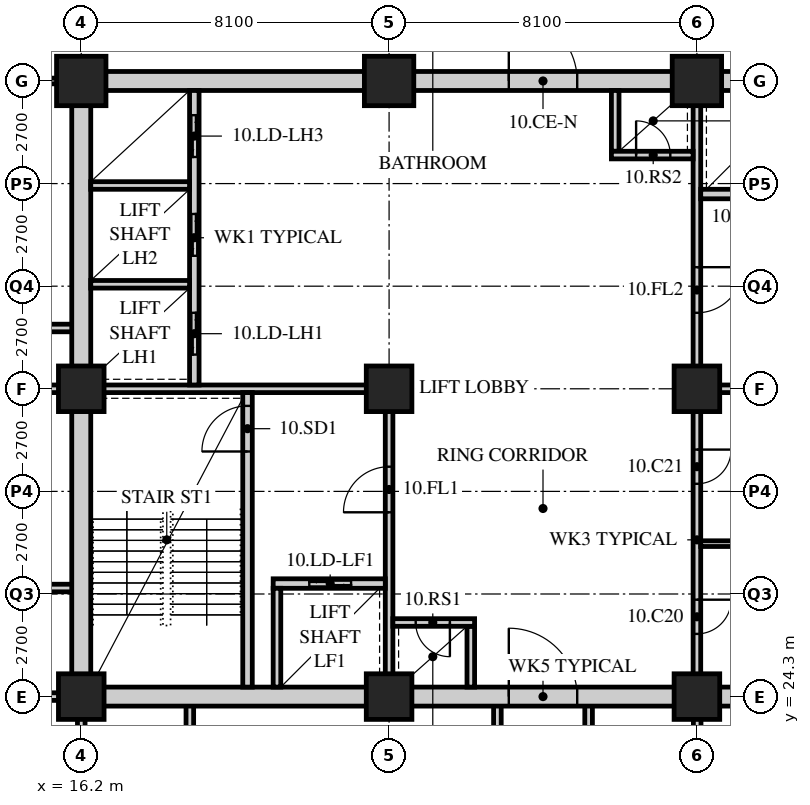
"""IFC4 building model, lengths in metres.
Left out: names, types, materials, properties, quantities, classifications, styles, units other than length and angle.
Written with IfcOpenShell. Run it as: python <this file> out.ifc"""

import sys

from ifc_helpers import new_model, si_unit, direction, frame, frame_2d, origin, origin_2d, place, context, subcontext, project, spatial, rectangle, hollow_rectangle, extrude, element, fill, save


model = new_model("IFC4")
c1 = context("Model", 3, precision=1e-05, world=origin(), true_north=direction((0.0, 1.0)))
c2 = subcontext(c1, "Body", "Model", "MODEL_VIEW")
j1 = project(units=[si_unit("LENGTHUNIT", "METRE"), si_unit("PLANEANGLEUNIT", "RADIAN")], contexts=[c1])
p1 = place(None, origin())
s1 = spatial("IfcSite", under=j1, at=p1, CompositionType="ELEMENT")
p2 = place(p1, origin())
s2 = spatial("IfcBuilding", under=s1, at=p2, CompositionType="ELEMENT")
p3 = place(p2, frame((0.0, 0.0, 46.6)))
s3 = spatial("IfcBuildingStorey", under=s2, at=p3, CompositionType="ELEMENT", Elevation=46.6)
for number, where, z_axis, x_axis in (
    (1, (16.2, 24.3, 0.0), (0.0, 0.0, 1.0), (1.0, 0.0, 0.0)),
    (2, (16.2, 32.4, 0.0), (0.0, 0.0, 1.0), (1.0, 0.0, 0.0)),
):
    element("IfcColumn", number, at=place(p3, frame(where, z_axis=z_axis, x_axis=x_axis)), inside=s3, PredefinedType="COLUMN", context=c2, shape_type="SweptSolid", body=[
        extrude(hollow_rectangle(XDim=1.2, YDim=1.2, WallThickness=0.12, at=origin_2d()), origin(), (0.0, 0.0, 1.0), 3.4),
    ])
p4 = place(p3, frame((16.2, 40.5, 0.0), z_axis=(0.0, 0.0, 1.0), x_axis=(1.0, 0.0, 0.0)))
e3 = element("IfcColumn", 3, at=p4, inside=s3, PredefinedType="COLUMN", context=c2, shape_type="SweptSolid", body=[
    extrude(hollow_rectangle(XDim=1.3, YDim=1.3, WallThickness=0.13, at=origin_2d()), origin(), (0.0, 0.0, 1.0), 3.4),
])
for number, where, z_axis, x_axis in (
    (4, (24.3, 24.3, 0.0), (0.0, 0.0, 1.0), (1.0, 0.0, 0.0)),
    (5, (24.3, 32.4, 0.0), (0.0, 0.0, 1.0), (1.0, 0.0, 0.0)),
):
    element("IfcColumn", number, at=place(p3, frame(where, z_axis=z_axis, x_axis=x_axis)), inside=s3, PredefinedType="COLUMN", context=c2, shape_type="SweptSolid", body=[
        extrude(hollow_rectangle(XDim=1.2, YDim=1.2, WallThickness=0.12, at=origin_2d()), origin(), (0.0, 0.0, 1.0), 3.4),
    ])
p5 = place(p3, frame((24.3, 40.5, 0.0), z_axis=(0.0, 0.0, 1.0), x_axis=(1.0, 0.0, 0.0)))
e6 = element("IfcColumn", 6, at=p5, inside=s3, PredefinedType="COLUMN", context=c2, shape_type="SweptSolid", body=[
    extrude(hollow_rectangle(XDim=1.3, YDim=1.3, WallThickness=0.13, at=origin_2d()), origin(), (0.0, 0.0, 1.0), 3.4),
])
for number, where, z_axis, x_axis in (
    (7, (32.4, 24.3, 0.0), (0.0, 0.0, 1.0), (1.0, 0.0, 0.0)),
    (8, (32.4, 32.4, 0.0), (0.0, 0.0, 1.0), (1.0, 0.0, 0.0)),
):
    element("IfcColumn", number, at=place(p3, frame(where, z_axis=z_axis, x_axis=x_axis)), inside=s3, PredefinedType="COLUMN", context=c2, shape_type="SweptSolid", body=[
        extrude(hollow_rectangle(XDim=1.2, YDim=1.2, WallThickness=0.12, at=origin_2d()), origin(), (0.0, 0.0, 1.0), 3.4),
    ])
p6 = place(p3, frame((32.4, 40.5, 0.0), z_axis=(0.0, 0.0, 1.0), x_axis=(1.0, 0.0, 0.0)))
e9 = element("IfcColumn", 9, at=p6, inside=s3, PredefinedType="COLUMN", context=c2, shape_type="SweptSolid", body=[
    extrude(hollow_rectangle(XDim=1.3, YDim=1.3, WallThickness=0.13, at=origin_2d()), origin(), (0.0, 0.0, 1.0), 3.4),
])
p7 = place(p3, frame((16.0, 40.5, 0.0), z_axis=(0.0, 0.0, 1.0), x_axis=(-1.0, 0.0, 0.0)))
e10 = element("IfcWall", 10, at=p7, inside=s3, PredefinedType="PARTITIONING", context=c2, shape_type="SweptSolid", body=[
    extrude(rectangle(XDim=6.1, YDim=0.15, at=frame_2d((3.05, 0.0))), origin(), (0.0, 0.0, 1.0), 2.578),
])
p8 = place(p3, frame((9.9, 32.4, 0.0), z_axis=(0.0, 0.0, 1.0), x_axis=(1.0, 0.0, 0.0)))
e11 = element("IfcWall", 11, at=p8, inside=s3, PredefinedType="SOLIDWALL", context=c2, shape_type="SweptSolid", body=[
    extrude(rectangle(XDim=6.3, YDim=0.2, at=frame_2d((3.15, 0.0))), origin(), (0.0, 0.0, 1.0), 2.578),
])
for number, where, z_axis, x_axis in (
    (12, (9.9, 27.157, 0.0), (0.0, 0.0, 1.0), (1.0, 0.0, 0.0)),
    (13, (9.9, 34.0, 0.0), (0.0, 0.0, 1.0), (1.0, 0.0, 0.0)),
):
    element("IfcWall", number, at=place(p3, frame(where, z_axis=z_axis, x_axis=x_axis)), inside=s3, PredefinedType="SOLIDWALL", context=c2, shape_type="SweptSolid", body=[
        extrude(rectangle(XDim=6.3, YDim=0.2, at=frame_2d((3.15, 0.0))), origin(), (0.0, 0.0, 1.0), 3.19),
    ])
p9 = place(p3, frame((16.2, 18.0, 0.0), z_axis=(0.0, 0.0, 1.0), x_axis=(0.0, 1.0, 0.0)))
e14 = element("IfcWall", 14, at=p9, inside=s3, PredefinedType="SOLIDWALL", context=c2, shape_type="SweptSolid", body=[
    extrude(rectangle(XDim=6.3, YDim=0.2, at=frame_2d((3.15, 0.0))), origin(), (0.0, 0.0, 1.0), 2.578),
])
p10 = place(p3, frame((19.057, 18.0, 0.0), z_axis=(0.0, 0.0, 1.0), x_axis=(0.0, 1.0, 0.0)))
e15 = element("IfcWall", 15, at=p10, inside=s3, PredefinedType="SOLIDWALL", context=c2, shape_type="SweptSolid", body=[
    extrude(rectangle(XDim=6.3, YDim=0.2, at=frame_2d((3.15, 0.0))), origin(), (0.0, 0.0, 1.0), 3.19),
])
p11 = place(p3, frame((32.407, 18.0, 0.0), z_axis=(0.0, 0.0, 1.0), x_axis=(0.0, 1.0, 0.0)))
e16 = element("IfcWall", 16, at=p11, inside=s3, PredefinedType="SOLIDWALL", context=c2, shape_type="SweptSolid", body=[
    extrude(rectangle(XDim=6.3, YDim=0.2, at=frame_2d((3.15, 0.0))), origin(), (0.0, 0.0, 1.0), 2.578),
])
for number, where, z_axis, x_axis in (
    (17, (27.15, 18.0, 0.0), (0.0, 0.0, 1.0), (0.0, 1.0, 0.0)),
    (18, (29.55, 18.0, 0.0), (0.0, 0.0, 1.0), (0.0, 1.0, 0.0)),
):
    element("IfcWall", number, at=place(p3, frame(where, z_axis=z_axis, x_axis=x_axis)), inside=s3, PredefinedType="SOLIDWALL", context=c2, shape_type="SweptSolid", body=[
        extrude(rectangle(XDim=6.3, YDim=0.2, at=frame_2d((3.15, 0.0))), origin(), (0.0, 0.0, 1.0), 3.19),
    ])
p12 = place(p3, frame((9.9, 24.3, 0.0), z_axis=(0.0, 0.0, 1.0), x_axis=(1.0, 0.0, 0.0)))
e19 = element("IfcWall", 19, at=p12, inside=s3, PredefinedType="SOLIDWALL", context=c2, shape_type="SweptSolid", body=[
    extrude(rectangle(XDim=6.3, YDim=0.2, at=frame_2d((3.15, 0.0))), origin(), (0.0, 0.0, 1.0), 2.578),
])
p13 = place(p3, frame((15.95, 24.3, 0.0), z_axis=(0.0, 0.0, 1.0), x_axis=(1.0, 0.0, 0.0)))
e20 = element("IfcWall", 20, at=p13, inside=s3, PredefinedType="SOLIDWALL", context=c2, shape_type="SweptSolid", body=[
    extrude(rectangle(XDim=24.8, YDim=0.5, at=frame_2d((12.4, 0.0))), origin(), (0.0, 0.0, 1.0), 2.54),
])
p14 = place(p13, frame((11.5, 0.0, 0.0)))
e21 = element("IfcOpeningElement", 21, at=p14, cuts=e20, PredefinedType="OPENING", context=c2, shape_type="SweptSolid", body=[
    extrude(rectangle(XDim=1.8, YDim=2.4, at=frame_2d((0.9, 1.2))), frame((0.0, 0.26, 0.0), z_axis=(0.0, -1.0, 0.0), x_axis=(1.0, 0.0, 0.0)), (0.0, 0.0, 1.0), 0.52),
])
p15 = place(p3, frame((15.95, 40.5, 0.0), z_axis=(0.0, 0.0, 1.0), x_axis=(1.0, 0.0, 0.0)))
e22 = element("IfcWall", 22, at=p15, inside=s3, PredefinedType="SOLIDWALL", context=c2, shape_type="SweptSolid", body=[
    extrude(rectangle(XDim=24.8, YDim=0.5, at=frame_2d((12.4, 0.0))), origin(), (0.0, 0.0, 1.0), 2.54),
])
p16 = place(p15, frame((11.5, 0.0, 0.0)))
e23 = element("IfcOpeningElement", 23, at=p16, cuts=e22, PredefinedType="OPENING", context=c2, shape_type="SweptSolid", body=[
    extrude(rectangle(XDim=1.8, YDim=2.4, at=frame_2d((0.9, 1.2))), frame((0.0, 0.26, 0.0), z_axis=(0.0, -1.0, 0.0), x_axis=(1.0, 0.0, 0.0)), (0.0, 0.0, 1.0), 0.52),
])
p17 = place(p3, frame((16.2, 24.55, 0.0), z_axis=(0.0, 0.0, 1.0), x_axis=(0.0, 1.0, 0.0)))
e24 = element("IfcWall", 24, at=p17, inside=s3, PredefinedType="SOLIDWALL", context=c2, shape_type="SweptSolid", body=[
    extrude(rectangle(XDim=15.7, YDim=0.5, at=frame_2d((7.85, 0.0))), origin(), (0.0, 0.0, 1.0), 2.578),
])
p18 = place(p3, frame((16.45, 32.4, 0.0), z_axis=(0.0, 0.0, 1.0), x_axis=(1.0, 0.0, 0.0)))
e25 = element("IfcWall", 25, at=p18, inside=s3, PredefinedType="SOLIDWALL", context=c2, shape_type="SweptSolid", body=[
    extrude(rectangle(XDim=7.95, YDim=0.2, at=frame_2d((3.975, 0.0))), origin(), (0.0, 0.0, 1.0), 2.578),
])
p19 = place(p3, frame((24.3, 24.55, 0.0), z_axis=(0.0, 0.0, 1.0), x_axis=(0.0, 1.0, 0.0)))
e26 = element("IfcWall", 26, at=p19, inside=s3, PredefinedType="SOLIDWALL", context=c2, shape_type="SweptSolid", body=[
    extrude(rectangle(XDim=7.75, YDim=0.2, at=frame_2d((3.875, 0.0))), origin(), (0.0, 0.0, 1.0), 2.578),
])
p20 = place(p19, frame((4.6, 0.0, 0.0)))
e27 = element("IfcOpeningElement", 27, at=p20, cuts=e26, PredefinedType="OPENING", context=c2, shape_type="SweptSolid", body=[
    extrude(rectangle(XDim=1.2, YDim=2.1, at=frame_2d((0.6, 1.05))), frame((0.0, 0.11, 0.0), z_axis=(0.0, -1.0, 0.0), x_axis=(1.0, 0.0, 0.0)), (0.0, 0.0, 1.0), 0.22),
])
p21 = place(p3, frame((20.575, 24.55, 0.0), z_axis=(0.0, 0.0, 1.0), x_axis=(0.0, 1.0, 0.0)))
e28 = element("IfcWall", 28, at=p21, inside=s3, PredefinedType="SOLIDWALL", context=c2, shape_type="SweptSolid", body=[
    extrude(rectangle(XDim=7.75, YDim=0.25, at=frame_2d((3.875, 0.0))), origin(), (0.0, 0.0, 1.0), 3.19),
])
p22 = place(p21, frame((6.2, 0.0, 0.0)))
e29 = element("IfcOpeningElement", 29, at=p22, cuts=e28, PredefinedType="OPENING", context=c2, shape_type="SweptSolid", body=[
    extrude(rectangle(XDim=1.2, YDim=2.1, at=frame_2d((0.6, 1.05))), frame((0.0, 0.135, 0.0), z_axis=(0.0, -1.0, 0.0), x_axis=(1.0, 0.0, 0.0)), (0.0, 0.0, 1.0), 0.27),
])
p23 = place(p3, frame((21.25, 27.275, 0.0), z_axis=(0.0, 0.0, 1.0), x_axis=(1.0, 0.0, 0.0)))
e30 = element("IfcWall", 30, at=p23, inside=s3, PredefinedType="SOLIDWALL", context=c2, shape_type="SweptSolid", body=[
    extrude(rectangle(XDim=2.95, YDim=0.25, at=frame_2d((1.475, 0.0))), origin(), (0.0, 0.0, 1.0), 3.19),
])
p24 = place(p23, frame((0.95, 0.0, 0.0)))
e31 = element("IfcOpeningElement", 31, at=p24, cuts=e30, PredefinedType="OPENING", context=c2, shape_type="SweptSolid", body=[
    extrude(rectangle(XDim=1.1, YDim=2.4, at=frame_2d((0.55, 1.2))), frame((0.0, 0.135, 0.0), z_axis=(0.0, -1.0, 0.0), x_axis=(1.0, 0.0, 0.0)), (0.0, 0.0, 1.0), 0.27),
])
p25 = place(p3, frame((21.35, 24.55, 0.0), z_axis=(0.0, 0.0, 1.0), x_axis=(0.0, 1.0, 0.0)))
e32 = element("IfcWall", 32, at=p25, inside=s3, PredefinedType="SOLIDWALL", context=c2, shape_type="SweptSolid", body=[
    extrude(rectangle(XDim=2.6, YDim=0.2, at=frame_2d((1.3, 0.0))), origin(), (0.0, 0.0, 1.0), 3.19),
])
p26 = place(p3, frame((19.175, 32.5, 0.0), z_axis=(0.0, 0.0, 1.0), x_axis=(0.0, 1.0, 0.0)))
e33 = element("IfcWall", 33, at=p26, inside=s3, PredefinedType="SOLIDWALL", context=c2, shape_type="SweptSolid", body=[
    extrude(rectangle(XDim=7.75, YDim=0.25, at=frame_2d((3.875, 0.0))), origin(), (0.0, 0.0, 1.0), 3.19),
])
p27 = place(p26, frame((0.8, 0.0, 0.0)))
e34 = element("IfcOpeningElement", 34, at=p27, cuts=e33, PredefinedType="OPENING", context=c2, shape_type="SweptSolid", body=[
    extrude(rectangle(XDim=1.1, YDim=2.4, at=frame_2d((0.55, 1.2))), frame((0.0, 0.135, 0.0), z_axis=(0.0, -1.0, 0.0), x_axis=(1.0, 0.0, 0.0)), (0.0, 0.0, 1.0), 0.27),
])
p28 = place(p26, frame((3.4, 0.0, 0.0)))
e35 = element("IfcOpeningElement", 35, at=p28, cuts=e33, PredefinedType="OPENING", context=c2, shape_type="SweptSolid", body=[
    extrude(rectangle(XDim=1.1, YDim=2.4, at=frame_2d((0.55, 1.2))), frame((0.0, 0.135, 0.0), z_axis=(0.0, -1.0, 0.0), x_axis=(1.0, 0.0, 0.0)), (0.0, 0.0, 1.0), 0.27),
])
p29 = place(p26, frame((6.0, 0.0, 0.0)))
e36 = element("IfcOpeningElement", 36, at=p29, cuts=e33, PredefinedType="OPENING", context=c2, shape_type="SweptSolid", body=[
    extrude(rectangle(XDim=1.1, YDim=2.4, at=frame_2d((0.55, 1.2))), frame((0.0, 0.135, 0.0), z_axis=(0.0, -1.0, 0.0), x_axis=(1.0, 0.0, 0.0)), (0.0, 0.0, 1.0), 0.27),
])
for number, where, z_axis, x_axis in (
    (37, (16.45, 35.15, 0.0), (0.0, 0.0, 1.0), (1.0, 0.0, 0.0)),
    (38, (16.45, 37.75, 0.0), (0.0, 0.0, 1.0), (1.0, 0.0, 0.0)),
):
    element("IfcWall", number, at=place(p3, frame(where, z_axis=z_axis, x_axis=x_axis)), inside=s3, PredefinedType="SOLIDWALL", context=c2, shape_type="SweptSolid", body=[
        extrude(rectangle(XDim=2.6, YDim=0.2, at=frame_2d((1.3, 0.0))), origin(), (0.0, 0.0, 1.0), 3.19),
    ])
p30 = place(p3, frame((26.45, 24.55, 0.0), z_axis=(0.0, 0.0, 1.0), x_axis=(0.0, 1.0, 0.0)))
e39 = element("IfcWall", 39, at=p30, inside=s3, PredefinedType="SOLIDWALL", context=c2, shape_type="SweptSolid", body=[
    extrude(rectangle(XDim=1.6, YDim=0.2, at=frame_2d((0.8, 0.0))), origin(), (0.0, 0.0, 1.0), 3.19),
])
p31 = place(p3, frame((24.4, 26.25, 0.0), z_axis=(0.0, 0.0, 1.0), x_axis=(1.0, 0.0, 0.0)))
e40 = element("IfcWall", 40, at=p31, inside=s3, PredefinedType="SOLIDWALL", context=c2, shape_type="SweptSolid", body=[
    extrude(rectangle(XDim=2.15, YDim=0.2, at=frame_2d((1.075, 0.0))), origin(), (0.0, 0.0, 1.0), 3.19),
])
p32 = place(p31, frame((0.6, 0.0, 0.0)))
e41 = element("IfcOpeningElement", 41, at=p32, cuts=e40, PredefinedType="OPENING", context=c2, shape_type="SweptSolid", body=[
    extrude(rectangle(XDim=0.9, YDim=2.1, at=frame_2d((0.45, 1.05))), frame((0.0, 0.11, 0.0), z_axis=(0.0, -1.0, 0.0), x_axis=(1.0, 0.0, 0.0)), (0.0, 0.0, 1.0), 0.22),
])
p33 = place(p3, frame((32.3, 32.4, 0.0), z_axis=(0.0, 0.0, 1.0), x_axis=(1.0, 0.0, 0.0)))
e42 = element("IfcWall", 42, at=p33, inside=s3, PredefinedType="SOLIDWALL", context=c2, shape_type="SweptSolid", body=[
    extrude(rectangle(XDim=7.95, YDim=0.2, at=frame_2d((3.975, 0.0))), origin(), (0.0, 0.0, 1.0), 2.578),
])
p34 = place(p3, frame((32.4, 32.5, 0.0), z_axis=(0.0, 0.0, 1.0), x_axis=(0.0, 1.0, 0.0)))
e43 = element("IfcWall", 43, at=p34, inside=s3, PredefinedType="SOLIDWALL", context=c2, shape_type="SweptSolid", body=[
    extrude(rectangle(XDim=7.75, YDim=0.2, at=frame_2d((3.875, 0.0))), origin(), (0.0, 0.0, 1.0), 2.578),
])
p35 = place(p34, frame((1.9, 0.0, 0.0)))
e44 = element("IfcOpeningElement", 44, at=p35, cuts=e43, PredefinedType="OPENING", context=c2, shape_type="SweptSolid", body=[
    extrude(rectangle(XDim=1.2, YDim=2.1, at=frame_2d((0.6, 1.05))), frame((0.0, 0.11, 0.0), z_axis=(0.0, -1.0, 0.0), x_axis=(1.0, 0.0, 0.0)), (0.0, 0.0, 1.0), 0.22),
])
p36 = place(p3, frame((32.5, 37.525, 0.0), z_axis=(0.0, 0.0, 1.0), x_axis=(1.0, 0.0, 0.0)))
e45 = element("IfcWall", 45, at=p36, inside=s3, PredefinedType="SOLIDWALL", context=c2, shape_type="SweptSolid", body=[
    extrude(rectangle(XDim=2.95, YDim=0.25, at=frame_2d((1.475, 0.0))), origin(), (0.0, 0.0, 1.0), 3.19),
])
p37 = place(p36, frame((0.9, 0.0, 0.0)))
e46 = element("IfcOpeningElement", 46, at=p37, cuts=e45, PredefinedType="OPENING", context=c2, shape_type="SweptSolid", body=[
    extrude(rectangle(XDim=1.1, YDim=2.4, at=frame_2d((0.55, 1.2))), frame((0.0, 0.135, 0.0), z_axis=(0.0, -1.0, 0.0), x_axis=(1.0, 0.0, 0.0)), (0.0, 0.0, 1.0), 0.27),
])
p38 = place(p3, frame((30.25, 38.65, 0.0), z_axis=(0.0, 0.0, 1.0), x_axis=(0.0, 1.0, 0.0)))
e47 = element("IfcWall", 47, at=p38, inside=s3, PredefinedType="SOLIDWALL", context=c2, shape_type="SweptSolid", body=[
    extrude(rectangle(XDim=1.6, YDim=0.2, at=frame_2d((0.8, 0.0))), origin(), (0.0, 0.0, 1.0), 3.19),
])
p39 = place(p3, frame((30.15, 38.55, 0.0), z_axis=(0.0, 0.0, 1.0), x_axis=(1.0, 0.0, 0.0)))
e48 = element("IfcWall", 48, at=p39, inside=s3, PredefinedType="SOLIDWALL", context=c2, shape_type="SweptSolid", body=[
    extrude(rectangle(XDim=2.15, YDim=0.2, at=frame_2d((1.075, 0.0))), origin(), (0.0, 0.0, 1.0), 3.19),
])
p40 = place(p39, frame((0.65, 0.0, 0.0)))
e49 = element("IfcOpeningElement", 49, at=p40, cuts=e48, PredefinedType="OPENING", context=c2, shape_type="SweptSolid", body=[
    extrude(rectangle(XDim=0.9, YDim=2.1, at=frame_2d((0.45, 1.05))), frame((0.0, 0.11, 0.0), z_axis=(0.0, -1.0, 0.0), x_axis=(1.0, 0.0, 0.0)), (0.0, 0.0, 1.0), 0.22),
])
p41 = place(p3, frame((32.4, 24.55, 0.0), z_axis=(0.0, 0.0, 1.0), x_axis=(0.0, 1.0, 0.0)))
e50 = element("IfcWall", 50, at=p41, inside=s3, PredefinedType="PARTITIONING", context=c2, shape_type="SweptSolid", body=[
    extrude(rectangle(XDim=7.75, YDim=0.2, at=frame_2d((3.875, 0.0))), origin(), (0.0, 0.0, 1.0), 2.578),
])
p42 = place(p41, frame((1.4, 0.0, 0.0)))
e51 = element("IfcOpeningElement", 51, at=p42, cuts=e50, PredefinedType="OPENING", context=c2, shape_type="SweptSolid", body=[
    extrude(rectangle(XDim=0.9, YDim=2.1, at=frame_2d((0.45, 1.05))), frame((0.0, 0.11, 0.0), z_axis=(0.0, -1.0, 0.0), x_axis=(1.0, 0.0, 0.0)), (0.0, 0.0, 1.0), 0.22),
])
p43 = place(p41, frame((5.35, 0.0, 0.0)))
e52 = element("IfcOpeningElement", 52, at=p43, cuts=e50, PredefinedType="OPENING", context=c2, shape_type="SweptSolid", body=[
    extrude(rectangle(XDim=0.9, YDim=2.1, at=frame_2d((0.45, 1.05))), frame((0.0, 0.11, 0.0), z_axis=(0.0, -1.0, 0.0), x_axis=(1.0, 0.0, 0.0)), (0.0, 0.0, 1.0), 0.22),
])
p44 = place(p3, frame((32.5, 28.325, 0.0), z_axis=(0.0, 0.0, 1.0), x_axis=(1.0, 0.0, 0.0)))
e53 = element("IfcWall", 53, at=p44, inside=s3, PredefinedType="PARTITIONING", context=c2, shape_type="SweptSolid", body=[
    extrude(rectangle(XDim=4.9, YDim=0.15, at=frame_2d((2.45, 0.0))), origin(), (0.0, 0.0, 1.0), 3.19),
])
p45 = place(p42, origin())
e54 = element("IfcDoor", 54, at=p45, inside=s3, OperationType="SINGLE_SWING_LEFT", PredefinedType="DOOR", context=c2, shape_type="SweptSolid", body=[
    extrude(rectangle(XDim=0.9, YDim=2.1, at=frame_2d((0.45, 1.05))), frame((0.0, 0.025, 0.0), z_axis=(0.0, -1.0, 0.0), x_axis=(1.0, 0.0, 0.0)), (0.0, 0.0, 1.0), 0.05),
])
fill(e51, e54)
p46 = place(p43, origin())
e55 = element("IfcDoor", 55, at=p46, inside=s3, OperationType="SINGLE_SWING_LEFT", PredefinedType="DOOR", context=c2, shape_type="SweptSolid", body=[
    extrude(rectangle(XDim=0.9, YDim=2.1, at=frame_2d((0.45, 1.05))), frame((0.0, 0.025, 0.0), z_axis=(0.0, -1.0, 0.0), x_axis=(1.0, 0.0, 0.0)), (0.0, 0.0, 1.0), 0.05),
])
fill(e52, e55)
p47 = place(p22, origin())
e56 = element("IfcDoor", 56, at=p47, inside=s3, OperationType="SINGLE_SWING_LEFT", PredefinedType="DOOR", context=c2, shape_type="SweptSolid", body=[
    extrude(rectangle(XDim=1.2, YDim=2.1, at=frame_2d((0.6, 1.05))), frame((0.0, 0.025, 0.0), z_axis=(0.0, -1.0, 0.0), x_axis=(1.0, 0.0, 0.0)), (0.0, 0.0, 1.0), 0.05),
])
fill(e29, e56)
p48 = place(p20, origin())
e57 = element("IfcDoor", 57, at=p48, inside=s3, OperationType="SINGLE_SWING_LEFT", PredefinedType="DOOR", context=c2, shape_type="SweptSolid", body=[
    extrude(rectangle(XDim=1.2, YDim=2.1, at=frame_2d((0.6, 1.05))), frame((0.0, 0.025, 0.0), z_axis=(0.0, -1.0, 0.0), x_axis=(1.0, 0.0, 0.0)), (0.0, 0.0, 1.0), 0.05),
])
fill(e27, e57)
p49 = place(p32, origin())
e58 = element("IfcDoor", 58, at=p49, inside=s3, OperationType="SINGLE_SWING_LEFT", PredefinedType="DOOR", context=c2, shape_type="SweptSolid", body=[
    extrude(rectangle(XDim=0.9, YDim=2.1, at=frame_2d((0.45, 1.05))), frame((0.0, 0.025, 0.0), z_axis=(0.0, -1.0, 0.0), x_axis=(1.0, 0.0, 0.0)), (0.0, 0.0, 1.0), 0.05),
])
fill(e41, e58)
p50 = place(p35, origin())
e59 = element("IfcDoor", 59, at=p50, inside=s3, OperationType="SINGLE_SWING_LEFT", PredefinedType="DOOR", context=c2, shape_type="SweptSolid", body=[
    extrude(rectangle(XDim=1.2, YDim=2.1, at=frame_2d((0.6, 1.05))), frame((0.0, 0.025, 0.0), z_axis=(0.0, -1.0, 0.0), x_axis=(1.0, 0.0, 0.0)), (0.0, 0.0, 1.0), 0.05),
])
fill(e44, e59)
p51 = place(p40, origin())
e60 = element("IfcDoor", 60, at=p51, inside=s3, OperationType="SINGLE_SWING_LEFT", PredefinedType="DOOR", context=c2, shape_type="SweptSolid", body=[
    extrude(rectangle(XDim=0.9, YDim=2.1, at=frame_2d((0.45, 1.05))), frame((0.0, 0.025, 0.0), z_axis=(0.0, -1.0, 0.0), x_axis=(1.0, 0.0, 0.0)), (0.0, 0.0, 1.0), 0.05),
])
fill(e49, e60)
p52 = place(p27, origin())
e61 = element("IfcDoor", 61, at=p52, inside=s3, OperationType="DOUBLE_DOOR_SLIDING", PredefinedType="DOOR", context=c2, shape_type="SweptSolid", body=[
    extrude(rectangle(XDim=1.1, YDim=2.4, at=frame_2d((0.55, 1.2))), frame((0.0, 0.025, 0.0), z_axis=(0.0, -1.0, 0.0), x_axis=(1.0, 0.0, 0.0)), (0.0, 0.0, 1.0), 0.05),
])
fill(e34, e61)
p53 = place(p28, origin())
e62 = element("IfcDoor", 62, at=p53, inside=s3, OperationType="DOUBLE_DOOR_SLIDING", PredefinedType="DOOR", context=c2, shape_type="SweptSolid", body=[
    extrude(rectangle(XDim=1.1, YDim=2.4, at=frame_2d((0.55, 1.2))), frame((0.0, 0.025, 0.0), z_axis=(0.0, -1.0, 0.0), x_axis=(1.0, 0.0, 0.0)), (0.0, 0.0, 1.0), 0.05),
])
fill(e35, e62)
p54 = place(p29, origin())
e63 = element("IfcDoor", 63, at=p54, inside=s3, OperationType="DOUBLE_DOOR_SLIDING", PredefinedType="DOOR", context=c2, shape_type="SweptSolid", body=[
    extrude(rectangle(XDim=1.1, YDim=2.4, at=frame_2d((0.55, 1.2))), frame((0.0, 0.025, 0.0), z_axis=(0.0, -1.0, 0.0), x_axis=(1.0, 0.0, 0.0)), (0.0, 0.0, 1.0), 0.05),
])
fill(e36, e63)
p55 = place(p24, origin())
e64 = element("IfcDoor", 64, at=p55, inside=s3, OperationType="DOUBLE_DOOR_SLIDING", PredefinedType="DOOR", context=c2, shape_type="SweptSolid", body=[
    extrude(rectangle(XDim=1.1, YDim=2.4, at=frame_2d((0.55, 1.2))), frame((0.0, 0.025, 0.0), z_axis=(0.0, -1.0, 0.0), x_axis=(1.0, 0.0, 0.0)), (0.0, 0.0, 1.0), 0.05),
])
fill(e31, e64)
p56 = place(p14, origin())
e65 = element("IfcDoor", 65, at=p56, inside=s3, OperationType="DOUBLE_DOOR_SINGLE_SWING", PredefinedType="DOOR", context=c2, shape_type="SweptSolid", body=[
    extrude(rectangle(XDim=1.8, YDim=2.4, at=frame_2d((0.9, 1.2))), frame((0.0, 0.025, 0.0), z_axis=(0.0, -1.0, 0.0), x_axis=(1.0, 0.0, 0.0)), (0.0, 0.0, 1.0), 0.05),
])
fill(e21, e65)
p57 = place(p16, origin())
e66 = element("IfcDoor", 66, at=p57, inside=s3, OperationType="DOUBLE_DOOR_SINGLE_SWING", PredefinedType="DOOR", context=c2, shape_type="SweptSolid", body=[
    extrude(rectangle(XDim=1.8, YDim=2.4, at=frame_2d((0.9, 1.2))), frame((0.0, 0.025, 0.0), z_axis=(0.0, -1.0, 0.0), x_axis=(1.0, 0.0, 0.0)), (0.0, 0.0, 1.0), 0.05),
])
fill(e23, e66)
save(model, sys.argv[1])
